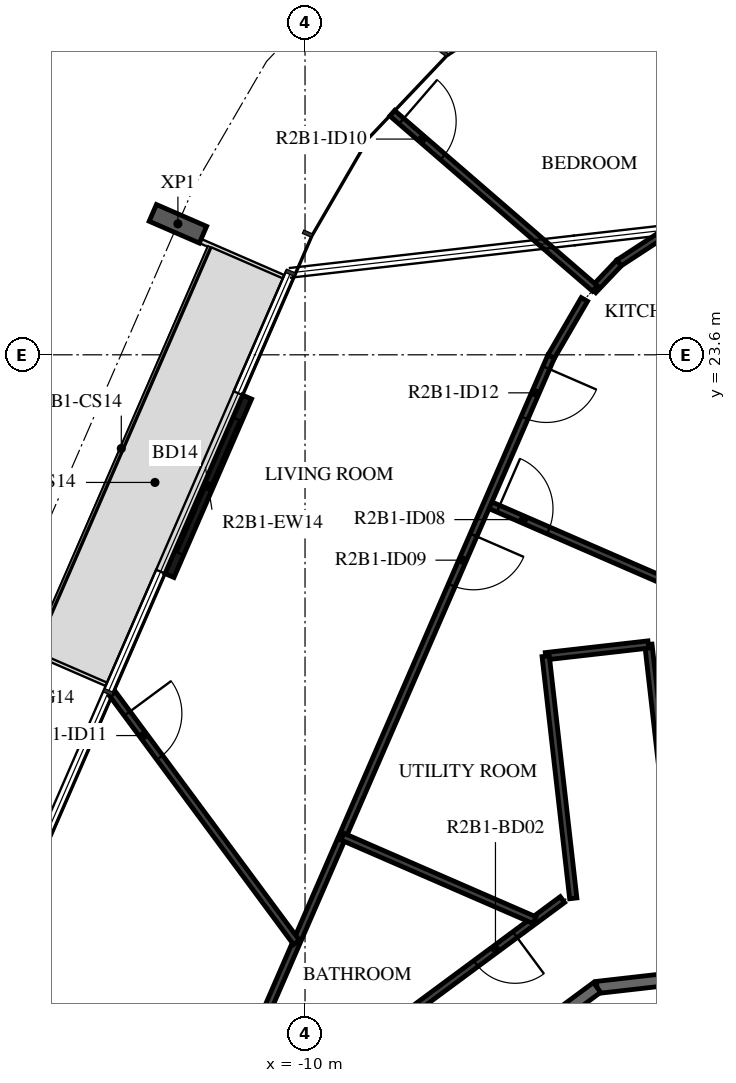
"""IFC4 building model, lengths in metres.
Left out: names, types, materials, properties, quantities, classifications, styles, units other than length and angle.
Written with IfcOpenShell. Run it as: python <this file> out.ifc"""

import sys

from ifc_helpers import new_model, si_unit, direction, frame, frame_2d, origin, origin_2d, place, context, subcontext, project, spatial, rectangle, i_section, extrude, element, fill, save


model = new_model("IFC4")
c1 = context("Model", 3, precision=1e-05, world=origin(), true_north=direction((0.0, 1.0)))
c2 = subcontext(c1, "Body", "Model", "MODEL_VIEW")
j1 = project(units=[si_unit("LENGTHUNIT", "METRE"), si_unit("PLANEANGLEUNIT", "RADIAN")], contexts=[c1])
p1 = place(None, origin())
s1 = spatial("IfcSite", under=j1, at=p1, CompositionType="ELEMENT")
p2 = place(p1, origin())
s2 = spatial("IfcBuilding", under=s1, at=p2, CompositionType="ELEMENT")
p3 = place(p2, frame((0.0, 0.0, 87.2)))
s3 = spatial("IfcBuildingStorey", under=s2, at=p3, CompositionType="ELEMENT", Elevation=87.2)
p4 = place(p3, frame((-12.091, 25.754, -0.38), z_axis=(0.0, 0.0, 1.0), x_axis=(0.398749038162, 0.917060087761, 0.0)))
e1 = element("IfcColumn", 1, at=p4, inside=s3, PredefinedType="COLUMN", context=c2, shape_type="SweptSolid", body=[
    extrude(i_section(OverallWidth=0.3, OverallDepth=0.9, WebThickness=0.019, FlangeThickness=0.035, FilletRadius=0.03, at=origin_2d()), origin(), (0.0, 0.0, 1.0), 3.5),
])
p5 = place(p3, frame((-10.953, 22.905, 0.0), z_axis=(0.0, 0.0, 1.0), x_axis=(-0.398784695066, -0.917044582876, 0.0)))
e2 = element("IfcWall", 2, at=p5, inside=s3, PredefinedType="STANDARD", context=c2, shape_type="SweptSolid", body=[
    extrude(rectangle(XDim=3.2, YDim=0.16, at=frame_2d((1.6, 0.0))), origin(), (0.0, 0.0, 1.0), 3.12),
])
p6 = place(p5, frame((0.4, 0.0, 0.0)))
e3 = element("IfcOpeningElement", 3, at=p6, cuts=e2, PredefinedType="OPENING", context=c2, shape_type="SweptSolid", body=[
    extrude(rectangle(XDim=2.4, YDim=2.4, at=frame_2d((1.2, 1.2))), frame((0.0, 0.09, 0.0), z_axis=(0.0, -1.0, 0.0), x_axis=(1.0, 0.0, 0.0)), (0.0, 0.0, 1.0), 0.18),
])
p7 = place(p3, frame((2.096, 14.028, 0.0), z_axis=(0.0, 0.0, 1.0), x_axis=(-0.993569170114, -0.113226782163, 0.0)))
e4 = element("IfcWall", 4, at=p7, inside=s3, PredefinedType="STANDARD", context=c2, shape_type="SweptSolid", body=[
    extrude(rectangle(XDim=7.342, YDim=0.2, at=frame_2d((3.671, 0.0))), origin(), (0.0, 0.0, 1.0), 3.12),
])
p8 = place(p3, frame((-5.198, 13.196, 0.0), z_axis=(0.0, 0.0, 1.0), x_axis=(-0.803864151363, -0.594812933748, 0.0)))
e5 = element("IfcWall", 5, at=p8, inside=s3, PredefinedType="STANDARD", context=c2, shape_type="SweptSolid", body=[
    extrude(rectangle(XDim=7.24, YDim=0.2, at=frame_2d((3.62, 0.0))), origin(), (0.0, 0.0, 1.0), 3.12),
])
p9 = place(p8, frame((5.7, 0.0, 0.0)))
e6 = element("IfcOpeningElement", 6, at=p9, cuts=e5, PredefinedType="OPENING", context=c2, shape_type="SweptSolid", body=[
    extrude(rectangle(XDim=1.0, YDim=2.1, at=frame_2d((0.5, 1.05))), frame((0.0, 0.11, 0.0), z_axis=(0.0, -1.0, 0.0), x_axis=(1.0, 0.0, 0.0)), (0.0, 0.0, 1.0), 0.22),
])
p10 = place(p3, frame((-3.9, 14.854, 0.0), z_axis=(0.0, 0.0, 1.0), x_axis=(-0.113178937308, 0.993574621329, 0.0)))
e7 = element("IfcWall", 7, at=p10, inside=s3, PredefinedType="PARTITIONING", context=c2, shape_type="SweptSolid", body=[
    extrude(rectangle(XDim=4.008, YDim=0.12, at=frame_2d((2.004, 0.0))), origin(), (0.0, 0.0, 1.0), 3.12),
])
p11 = place(p3, frame((-4.354, 18.836, 0.0), z_axis=(0.0, 0.0, 1.0), x_axis=(-0.99355903199, -0.113315709199, 0.0)))
e8 = element("IfcWall", 8, at=p11, inside=s3, PredefinedType="PARTITIONING", context=c2, shape_type="SweptSolid", body=[
    extrude(rectangle(XDim=1.7, YDim=0.12, at=frame_2d((0.85, 0.0))), origin(), (0.0, 0.0, 1.0), 3.12),
])
p12 = place(p3, frame((-6.042, 18.644, 0.0), z_axis=(0.0, 0.0, 1.0), x_axis=(0.113185787648, -0.993573840977, 0.0)))
e9 = element("IfcWall", 9, at=p12, inside=s3, PredefinedType="PARTITIONING", context=c2, shape_type="SweptSolid", body=[
    extrude(rectangle(XDim=4.008, YDim=0.12, at=frame_2d((2.004, 0.0))), origin(), (0.0, 0.0, 1.0), 3.12),
])
p13 = place(p3, frame((-5.767, 14.641, 0.0), z_axis=(0.0, 0.0, 1.0), x_axis=(-0.803853364238, -0.594827511807, 0.0)))
e10 = element("IfcWall", 10, at=p13, inside=s3, PredefinedType="PARTITIONING", context=c2, shape_type="SweptSolid", body=[
    extrude(rectangle(XDim=8.146, YDim=0.12, at=frame_2d((4.073, 0.0))), origin(), (0.0, 0.0, 1.0), 3.12),
])
p14 = place(p13, frame((0.97, 0.0, 0.0)))
e11 = element("IfcOpeningElement", 11, at=p14, cuts=e10, PredefinedType="OPENING", context=c2, shape_type="SweptSolid", body=[
    extrude(rectangle(XDim=0.8, YDim=2.1, at=frame_2d((0.4, 1.05))), frame((0.0, 0.07, 0.0), z_axis=(0.0, -1.0, 0.0), x_axis=(1.0, 0.0, 0.0)), (0.0, 0.0, 1.0), 0.14),
])
p15 = place(p3, frame((-5.261, 24.663, 0.0), z_axis=(0.0, 0.0, 1.0), x_axis=(0.688324306424, 0.725403094277, 0.0)))
e12 = element("IfcWall", 12, at=p15, inside=s3, PredefinedType="PARTITIONING", context=c2, shape_type="SweptSolid", body=[
    extrude(rectangle(XDim=0.619, YDim=0.12, at=frame_2d((0.31, 0.0))), origin(), (0.0, 0.0, 1.0), 3.12),
])
p16 = place(p3, frame((-4.835, 25.112, 0.0), z_axis=(0.0, 0.0, 1.0), x_axis=(0.837047461437, 0.547130283664, 0.0)))
e13 = element("IfcWall", 13, at=p16, inside=s3, PredefinedType="PARTITIONING", context=c2, shape_type="SweptSolid", body=[
    extrude(rectangle(XDim=0.829, YDim=0.12, at=frame_2d((0.414, 0.0))), origin(), (0.0, 0.0, 1.0), 3.12),
])
p17 = place(p3, frame((-8.566, 27.573, 0.0), z_axis=(0.0, 0.0, 1.0), x_axis=(0.756463964606, -0.654035373854, 0.0)))
e14 = element("IfcWall", 14, at=p17, inside=s3, PredefinedType="PARTITIONING", context=c2, shape_type="SweptSolid", body=[
    extrude(rectangle(XDim=4.405, YDim=0.12, at=frame_2d((2.202, 0.0))), origin(), (0.0, 0.0, 1.0), 3.12),
])
p18 = place(p17, frame((0.2, 0.0, 0.0)))
e15 = element("IfcOpeningElement", 15, at=p18, cuts=e14, PredefinedType="OPENING", context=c2, shape_type="SweptSolid", body=[
    extrude(rectangle(XDim=0.9, YDim=2.1, at=frame_2d((0.45, 1.05))), frame((0.0, 0.07, 0.0), z_axis=(0.0, -1.0, 0.0), x_axis=(1.0, 0.0, 0.0)), (0.0, 0.0, 1.0), 0.14),
])
p19 = place(p3, frame((-7.005, 21.149, 0.0), z_axis=(0.0, 0.0, 1.0), x_axis=(0.917050915224, -0.398770132891, 0.0)))
e16 = element("IfcWall", 16, at=p19, inside=s3, PredefinedType="PARTITIONING", context=c2, shape_type="SweptSolid", body=[
    extrude(rectangle(XDim=5.272, YDim=0.12, at=frame_2d((2.636, 0.0))), origin(), (0.0, 0.0, 1.0), 3.12),
])
p20 = place(p19, frame((0.2, 0.0, 0.0)))
e17 = element("IfcOpeningElement", 17, at=p20, cuts=e16, PredefinedType="OPENING", context=c2, shape_type="SweptSolid", body=[
    extrude(rectangle(XDim=0.9, YDim=2.1, at=frame_2d((0.45, 1.05))), frame((0.0, 0.07, 0.0), z_axis=(0.0, -1.0, 0.0), x_axis=(1.0, 0.0, 0.0)), (0.0, 0.0, 1.0), 0.14),
])
p21 = place(p3, frame((-5.406, 24.51, 0.0), z_axis=(0.0, 0.0, 1.0), x_axis=(-0.502487709822, -0.864584351858, 0.0)))
e18 = element("IfcWall", 18, at=p21, inside=s3, PredefinedType="PARTITIONING", context=c2, shape_type="SweptSolid", body=[
    extrude(rectangle(XDim=1.087, YDim=0.12, at=frame_2d((0.543, 0.0))), origin(), (0.0, 0.0, 1.0), 3.12),
])
p22 = place(p3, frame((-5.952, 23.571, 0.0), z_axis=(0.0, 0.0, 1.0), x_axis=(-0.398745097158, -0.917061801348, 0.0)))
e19 = element("IfcWall", 19, at=p22, inside=s3, PredefinedType="PARTITIONING", context=c2, shape_type="SweptSolid", body=[
    extrude(rectangle(XDim=14.576, YDim=0.12, at=frame_2d((7.288, 0.0))), origin(), (0.0, 0.0, 1.0), 3.12),
])
p23 = place(p22, frame((3.201, 0.0, 0.0)))
e20 = element("IfcOpeningElement", 20, at=p23, cuts=e19, PredefinedType="OPENING", context=c2, shape_type="SweptSolid", body=[
    extrude(rectangle(XDim=0.9, YDim=2.1, at=frame_2d((0.45, 1.05))), frame((0.0, 0.07, 0.0), z_axis=(0.0, -1.0, 0.0), x_axis=(1.0, 0.0, 0.0)), (0.0, 0.0, 1.0), 0.14),
])
p24 = place(p22, frame((0.2, 0.0, 0.0)))
e21 = element("IfcOpeningElement", 21, at=p24, cuts=e19, PredefinedType="OPENING", context=c2, shape_type="SweptSolid", body=[
    extrude(rectangle(XDim=0.9, YDim=2.1, at=frame_2d((0.45, 1.05))), frame((0.0, 0.07, 0.0), z_axis=(0.0, -1.0, 0.0), x_axis=(1.0, 0.0, 0.0)), (0.0, 0.0, 1.0), 0.14),
])
p25 = place(p3, frame((-9.385, 15.676, 0.0), z_axis=(0.0, 0.0, 1.0), x_axis=(0.917068929701, -0.398728702475, 0.0)))
e22 = element("IfcWall", 22, at=p25, inside=s3, PredefinedType="PARTITIONING", context=c2, shape_type="SweptSolid", body=[
    extrude(rectangle(XDim=3.445, YDim=0.12, at=frame_2d((1.723, 0.0))), origin(), (0.0, 0.0, 1.0), 3.12),
])
p26 = place(p3, frame((-13.163, 18.022, 0.0), z_axis=(0.0, 0.0, 1.0), x_axis=(0.594797671626, -0.803875444226, 0.0)))
e23 = element("IfcWall", 23, at=p26, inside=s3, PredefinedType="PARTITIONING", context=c2, shape_type="SweptSolid", body=[
    extrude(rectangle(XDim=5.081, YDim=0.12, at=frame_2d((2.54, 0.0))), origin(), (0.0, 0.0, 1.0), 3.12),
])
p27 = place(p26, frame((0.4, 0.0, 0.0)))
e24 = element("IfcOpeningElement", 24, at=p27, cuts=e23, PredefinedType="OPENING", context=c2, shape_type="SweptSolid", body=[
    extrude(rectangle(XDim=0.9, YDim=2.1, at=frame_2d((0.45, 1.05))), frame((0.0, 0.07, 0.0), z_axis=(0.0, -1.0, 0.0), x_axis=(1.0, 0.0, 0.0)), (0.0, 0.0, 1.0), 0.14),
])
p28 = place(p6, origin())
e25 = element("IfcDoor", 25, at=p28, inside=s3, OperationType="DOUBLE_DOOR_SLIDING", PredefinedType="DOOR", context=c2, shape_type="SweptSolid", body=[
    extrude(rectangle(XDim=2.4, YDim=2.4, at=frame_2d((1.2, 1.2))), frame((0.0, 0.025, 0.0), z_axis=(0.0, -1.0, 0.0), x_axis=(1.0, 0.0, 0.0)), (0.0, 0.0, 1.0), 0.05),
])
fill(e3, e25)
p29 = place(p14, origin())
e26 = element("IfcDoor", 26, at=p29, inside=s3, OperationType="SINGLE_SWING_LEFT", PredefinedType="DOOR", context=c2, shape_type="SweptSolid", body=[
    extrude(rectangle(XDim=0.8, YDim=2.1, at=frame_2d((0.4, 1.05))), frame((0.0, 0.025, 0.0), z_axis=(0.0, -1.0, 0.0), x_axis=(1.0, 0.0, 0.0)), (0.0, 0.0, 1.0), 0.05),
])
fill(e11, e26)
p30 = place(p20, origin())
e27 = element("IfcDoor", 27, at=p30, inside=s3, OperationType="SINGLE_SWING_LEFT", PredefinedType="DOOR", context=c2, shape_type="SweptSolid", body=[
    extrude(rectangle(XDim=0.9, YDim=2.1, at=frame_2d((0.45, 1.05))), frame((0.0, 0.025, 0.0), z_axis=(0.0, -1.0, 0.0), x_axis=(1.0, 0.0, 0.0)), (0.0, 0.0, 1.0), 0.05),
])
fill(e17, e27)
p31 = place(p23, origin())
e28 = element("IfcDoor", 28, at=p31, inside=s3, OperationType="SINGLE_SWING_LEFT", PredefinedType="DOOR", context=c2, shape_type="SweptSolid", body=[
    extrude(rectangle(XDim=0.9, YDim=2.1, at=frame_2d((0.45, 1.05))), frame((0.0, 0.025, 0.0), z_axis=(0.0, -1.0, 0.0), x_axis=(1.0, 0.0, 0.0)), (0.0, 0.0, 1.0), 0.05),
])
fill(e20, e28)
p32 = place(p18, origin())
e29 = element("IfcDoor", 29, at=p32, inside=s3, OperationType="SINGLE_SWING_LEFT", PredefinedType="DOOR", context=c2, shape_type="SweptSolid", body=[
    extrude(rectangle(XDim=0.9, YDim=2.1, at=frame_2d((0.45, 1.05))), frame((0.0, 0.025, 0.0), z_axis=(0.0, -1.0, 0.0), x_axis=(1.0, 0.0, 0.0)), (0.0, 0.0, 1.0), 0.05),
])
fill(e15, e29)
p33 = place(p27, origin())
e30 = element("IfcDoor", 30, at=p33, inside=s3, OperationType="SINGLE_SWING_RIGHT", PredefinedType="DOOR", context=c2, shape_type="SweptSolid", body=[
    extrude(rectangle(XDim=0.9, YDim=2.1, at=frame_2d((0.45, 1.05))), frame((0.0, 0.025, 0.0), z_axis=(0.0, -1.0, 0.0), x_axis=(1.0, 0.0, 0.0)), (0.0, 0.0, 1.0), 0.05),
])
fill(e24, e30)
p34 = place(p24, origin())
e31 = element("IfcDoor", 31, at=p34, inside=s3, OperationType="SINGLE_SWING_RIGHT", PredefinedType="DOOR", context=c2, shape_type="SweptSolid", body=[
    extrude(rectangle(XDim=0.9, YDim=2.1, at=frame_2d((0.45, 1.05))), frame((0.0, 0.025, 0.0), z_axis=(0.0, -1.0, 0.0), x_axis=(1.0, 0.0, 0.0)), (0.0, 0.0, 1.0), 0.05),
])
fill(e21, e31)
save(model, sys.argv[1])
